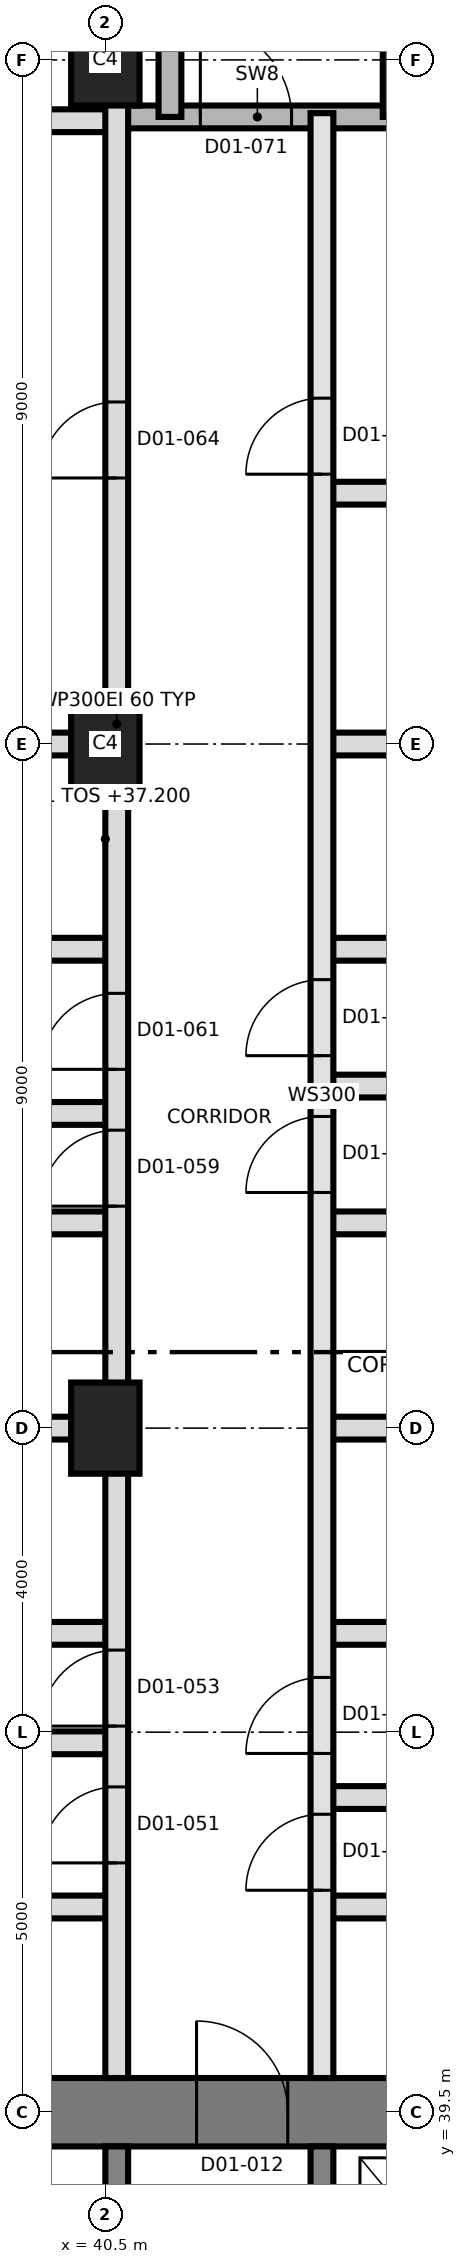
"""IFC4 building model, lengths in metres.
Left out: names, types, materials, properties, quantities, classifications, styles, units other than length and angle.
Written with IfcOpenShell. Run it as: python <this file> out.ifc"""

import sys

from ifc_helpers import new_model, si_unit, direction, frame, frame_2d, origin, origin_2d, place, context, subcontext, project, spatial, rectangle, extrude, element, fill, save


model = new_model("IFC4")
c1 = context("Model", 3, precision=1e-05, world=origin(), true_north=direction((0.0, 1.0)))
c2 = subcontext(c1, "Body", "Model", "MODEL_VIEW")
j1 = project(units=[si_unit("LENGTHUNIT", "METRE"), si_unit("PLANEANGLEUNIT", "RADIAN")], contexts=[c1])
p1 = place(None, origin())
s1 = spatial("IfcSite", under=j1, at=p1, CompositionType="ELEMENT")
p2 = place(p1, origin())
s2 = spatial("IfcBuilding", under=s1, at=p2, CompositionType="ELEMENT")
p3 = place(p2, frame((0.0, 0.0, 37.2)))
s3 = spatial("IfcBuildingStorey", under=s2, at=p3, CompositionType="ELEMENT", Elevation=37.2)
p4 = place(p3, frame((31.05, 39.5, 0.0), z_axis=(0.0, 0.0, 1.0), x_axis=(1.0, 0.0, 0.0)))
e1 = element("IfcWall", 1, at=p4, inside=s3, PredefinedType="SHEAR", context=c2, shape_type="SweptSolid", body=[
    extrude(rectangle(XDim=27.0, YDim=0.9, at=frame_2d((13.5, 0.0))), origin(), (0.0, 0.0, 1.0), 3.7),
])
p5 = place(p4, frame((10.65, 0.0, 0.0)))
e2 = element("IfcOpeningElement", 2, at=p5, cuts=e1, PredefinedType="OPENING", context=c2, shape_type="SweptSolid", body=[
    extrude(rectangle(XDim=1.2, YDim=2.1, at=frame_2d((0.6, 1.05))), frame((0.0, 0.46, 0.0), z_axis=(0.0, -1.0, 0.0), x_axis=(1.0, 0.0, 0.0)), (0.0, 0.0, 1.0), 0.92),
])
for number, where, z_axis, x_axis in (
    (3, (40.65, 33.5, 0.0), (0.0, 0.0, 1.0), (0.0, 1.0, 0.0)),
    (4, (43.35, 33.5, 0.0), (0.0, 0.0, 1.0), (0.0, 1.0, 0.0)),
):
    element("IfcWall", number, at=place(p3, frame(where, z_axis=z_axis, x_axis=x_axis)), inside=s3, PredefinedType="SHEAR", context=c2, shape_type="SweptSolid", body=[
        extrude(rectangle(XDim=5.55, YDim=0.3, at=frame_2d((2.775, 0.0))), origin(), (0.0, 0.0, 1.0), 3.7),
    ])
for number, where, z_axis, x_axis in (
    (5, (40.5, 48.5, 0.0), (0.0, 0.0, 1.0), (0.0, 1.0, 0.0)),
    (6, (40.5, 57.5, 0.0), (0.0, 0.0, 1.0), (0.0, 1.0, 0.0)),
    (7, (40.5, 66.5, 0.0), (0.0, 0.0, 1.0), (0.0, 1.0, 0.0)),
):
    element("IfcColumn", number, at=place(p3, frame(where, z_axis=z_axis, x_axis=x_axis)), inside=s3, PredefinedType="COLUMN", context=c2, shape_type="SweptSolid", body=[
        extrude(rectangle(XDim=1.2, YDim=0.9, at=origin_2d()), origin(), (0.0, 0.0, 1.0), 3.7),
    ])
for number, where, z_axis, x_axis in (
    (8, (37.45, 42.2, 0.0), (0.0, 0.0, 1.0), (1.0, 0.0, 0.0)),
    (9, (43.35, 42.2, 0.0), (0.0, 0.0, 1.0), (1.0, 0.0, 0.0)),
):
    element("IfcWall", number, at=place(p3, frame(where, z_axis=z_axis, x_axis=x_axis)), inside=s3, PredefinedType="PARTITIONING", context=c2, shape_type="SweptSolid", body=[
        extrude(rectangle(XDim=3.2, YDim=0.3, at=frame_2d((1.6, 0.0))), origin(), (0.0, 0.0, 1.0), 3.4),
    ])
p6 = place(p3, frame((43.35, 43.64, 0.0), z_axis=(0.0, 0.0, 1.0), x_axis=(1.0, 0.0, 0.0)))
e10 = element("IfcWall", 10, at=p6, inside=s3, PredefinedType="PARTITIONING", context=c2, shape_type="SweptSolid", body=[
    extrude(rectangle(XDim=6.796, YDim=0.3, at=frame_2d((3.398, 0.0))), origin(), (0.0, 0.0, 1.0), 3.4),
])
p7 = place(p3, frame((31.425, 44.36, 0.0), z_axis=(0.0, 0.0, 1.0), x_axis=(1.0, 0.0, 0.0)))
e11 = element("IfcWall", 11, at=p7, inside=s3, PredefinedType="PARTITIONING", context=c2, shape_type="SweptSolid", body=[
    extrude(rectangle(XDim=9.225, YDim=0.3, at=frame_2d((4.612, 0.0))), origin(), (0.0, 0.0, 1.0), 3.4),
])
for number, where, z_axis, x_axis in (
    (12, (37.45, 45.8, 0.0), (0.0, 0.0, 1.0), (1.0, 0.0, 0.0)),
    (13, (43.35, 45.8, 0.0), (0.0, 0.0, 1.0), (1.0, 0.0, 0.0)),
):
    element("IfcWall", number, at=place(p3, frame(where, z_axis=z_axis, x_axis=x_axis)), inside=s3, PredefinedType="PARTITIONING", context=c2, shape_type="SweptSolid", body=[
        extrude(rectangle(XDim=3.2, YDim=0.3, at=frame_2d((1.6, 0.0))), origin(), (0.0, 0.0, 1.0), 3.4),
    ])
p8 = place(p3, frame((31.425, 48.5, 0.0), z_axis=(0.0, 0.0, 1.0), x_axis=(1.0, 0.0, 0.0)))
e14 = element("IfcWall", 14, at=p8, inside=s3, PredefinedType="PARTITIONING", context=c2, shape_type="SweptSolid", body=[
    extrude(rectangle(XDim=9.225, YDim=0.3, at=frame_2d((4.612, 0.0))), origin(), (0.0, 0.0, 1.0), 3.4),
])
p9 = place(p3, frame((43.35, 48.5, 0.0), z_axis=(0.0, 0.0, 1.0), x_axis=(1.0, 0.0, 0.0)))
e15 = element("IfcWall", 15, at=p9, inside=s3, PredefinedType="PARTITIONING", context=c2, shape_type="SweptSolid", body=[
    extrude(rectangle(XDim=6.225, YDim=0.3, at=frame_2d((3.112, 0.0))), origin(), (0.0, 0.0, 1.0), 3.4),
])
for number, where, z_axis, x_axis in (
    (16, (37.45, 51.2, 0.0), (0.0, 0.0, 1.0), (1.0, 0.0, 0.0)),
    (17, (43.35, 51.2, 0.0), (0.0, 0.0, 1.0), (1.0, 0.0, 0.0)),
):
    element("IfcWall", number, at=place(p3, frame(where, z_axis=z_axis, x_axis=x_axis)), inside=s3, PredefinedType="PARTITIONING", context=c2, shape_type="SweptSolid", body=[
        extrude(rectangle(XDim=3.2, YDim=0.3, at=frame_2d((1.6, 0.0))), origin(), (0.0, 0.0, 1.0), 3.4),
    ])
p10 = place(p3, frame((31.425, 52.64, 0.0), z_axis=(0.0, 0.0, 1.0), x_axis=(1.0, 0.0, 0.0)))
e18 = element("IfcWall", 18, at=p10, inside=s3, PredefinedType="PARTITIONING", context=c2, shape_type="SweptSolid", body=[
    extrude(rectangle(XDim=9.225, YDim=0.3, at=frame_2d((4.612, 0.0))), origin(), (0.0, 0.0, 1.0), 3.4),
])
p11 = place(p3, frame((43.35, 53.0, 0.0), z_axis=(0.0, 0.0, 1.0), x_axis=(1.0, 0.0, 0.0)))
e19 = element("IfcWall", 19, at=p11, inside=s3, PredefinedType="PARTITIONING", context=c2, shape_type="SweptSolid", body=[
    extrude(rectangle(XDim=6.405, YDim=0.3, at=frame_2d((3.202, 0.0))), origin(), (0.0, 0.0, 1.0), 3.4),
])
for number, where, z_axis, x_axis in (
    (20, (37.45, 54.8, 0.0), (0.0, 0.0, 1.0), (1.0, 0.0, 0.0)),
    (21, (43.35, 54.8, 0.0), (0.0, 0.0, 1.0), (1.0, 0.0, 0.0)),
):
    element("IfcWall", number, at=place(p3, frame(where, z_axis=z_axis, x_axis=x_axis)), inside=s3, PredefinedType="PARTITIONING", context=c2, shape_type="SweptSolid", body=[
        extrude(rectangle(XDim=3.2, YDim=0.3, at=frame_2d((1.6, 0.0))), origin(), (0.0, 0.0, 1.0), 3.4),
    ])
p12 = place(p3, frame((31.425, 57.5, 0.0), z_axis=(0.0, 0.0, 1.0), x_axis=(1.0, 0.0, 0.0)))
e22 = element("IfcWall", 22, at=p12, inside=s3, PredefinedType="PARTITIONING", context=c2, shape_type="SweptSolid", body=[
    extrude(rectangle(XDim=9.225, YDim=0.3, at=frame_2d((4.612, 0.0))), origin(), (0.0, 0.0, 1.0), 3.4),
])
p13 = place(p3, frame((43.35, 57.5, 0.0), z_axis=(0.0, 0.0, 1.0), x_axis=(1.0, 0.0, 0.0)))
e23 = element("IfcWall", 23, at=p13, inside=s3, PredefinedType="PARTITIONING", context=c2, shape_type="SweptSolid", body=[
    extrude(rectangle(XDim=6.225, YDim=0.3, at=frame_2d((3.112, 0.0))), origin(), (0.0, 0.0, 1.0), 3.4),
])
p14 = place(p3, frame((43.35, 60.8, 0.0), z_axis=(0.0, 0.0, 1.0), x_axis=(1.0, 0.0, 0.0)))
e24 = element("IfcWall", 24, at=p14, inside=s3, PredefinedType="PARTITIONING", context=c2, shape_type="SweptSolid", body=[
    extrude(rectangle(XDim=3.5, YDim=0.3, at=frame_2d((1.75, 0.0))), origin(), (0.0, 0.0, 1.0), 3.4),
])
p15 = place(p3, frame((31.425, 65.7, 0.0), z_axis=(0.0, 0.0, 1.0), x_axis=(1.0, 0.0, 0.0)))
e25 = element("IfcWall", 25, at=p15, inside=s3, PredefinedType="PARTITIONING", context=c2, shape_type="SweptSolid", body=[
    extrude(rectangle(XDim=9.225, YDim=0.3, at=frame_2d((4.612, 0.0))), origin(), (0.0, 0.0, 1.0), 3.4),
])
p16 = place(p15, frame((3.575, 0.0, 0.0)))
e26 = element("IfcOpeningElement", 26, at=p16, cuts=e25, PredefinedType="OPENING", context=c2, shape_type="SweptSolid", body=[
    extrude(rectangle(XDim=1.0, YDim=2.1, at=frame_2d((0.5, 1.05))), frame((0.0, 0.16, 0.0), z_axis=(0.0, -1.0, 0.0), x_axis=(1.0, 0.0, 0.0)), (0.0, 0.0, 1.0), 0.32),
])
p17 = place(p3, frame((40.65, 65.75, 0.0), z_axis=(0.0, 0.0, 1.0), x_axis=(1.0, 0.0, 0.0)))
e27 = element("IfcWall", 27, at=p17, inside=s3, PredefinedType="SHEAR", context=c2, shape_type="SweptSolid", body=[
    extrude(rectangle(XDim=3.7, YDim=0.3, at=frame_2d((1.85, 0.0))), origin(), (0.0, 0.0, 1.0), 3.4),
])
p18 = place(p17, frame((1.1, 0.0, 0.0)))
e28 = element("IfcOpeningElement", 28, at=p18, cuts=e27, PredefinedType="OPENING", context=c2, shape_type="SweptSolid", body=[
    extrude(rectangle(XDim=1.2, YDim=2.1, at=frame_2d((0.6, 1.05))), frame((0.0, 0.16, 0.0), z_axis=(0.0, -1.0, 0.0), x_axis=(1.0, 0.0, 0.0)), (0.0, 0.0, 1.0), 0.32),
])
p19 = place(p3, frame((40.65, 39.95, 0.0), z_axis=(0.0, 0.0, 1.0), x_axis=(0.0, 1.0, 0.0)))
e29 = element("IfcWall", 29, at=p19, inside=s3, PredefinedType="PARTITIONING", context=c2, shape_type="SweptSolid", body=[
    extrude(rectangle(XDim=35.625, YDim=0.3, at=frame_2d((17.812, 0.0))), origin(), (0.0, 0.0, 1.0), 3.4),
])
p20 = place(p19, frame((2.83, 0.0, 0.0)))
e30 = element("IfcOpeningElement", 30, at=p20, cuts=e29, PredefinedType="OPENING", context=c2, shape_type="SweptSolid", body=[
    extrude(rectangle(XDim=1.0, YDim=2.1, at=frame_2d((0.5, 1.05))), frame((0.0, 0.16, 0.0), z_axis=(0.0, -1.0, 0.0), x_axis=(1.0, 0.0, 0.0)), (0.0, 0.0, 1.0), 0.32),
])
p21 = place(p19, frame((4.63, 0.0, 0.0)))
e31 = element("IfcOpeningElement", 31, at=p21, cuts=e29, PredefinedType="OPENING", context=c2, shape_type="SweptSolid", body=[
    extrude(rectangle(XDim=1.0, YDim=2.1, at=frame_2d((0.5, 1.05))), frame((0.0, 0.16, 0.0), z_axis=(0.0, -1.0, 0.0), x_axis=(1.0, 0.0, 0.0)), (0.0, 0.0, 1.0), 0.32),
])
p22 = place(p19, frame((11.47, 0.0, 0.0)))
e32 = element("IfcOpeningElement", 32, at=p22, cuts=e29, PredefinedType="OPENING", context=c2, shape_type="SweptSolid", body=[
    extrude(rectangle(XDim=1.0, YDim=2.1, at=frame_2d((0.5, 1.05))), frame((0.0, 0.16, 0.0), z_axis=(0.0, -1.0, 0.0), x_axis=(1.0, 0.0, 0.0)), (0.0, 0.0, 1.0), 0.32),
])
p23 = place(p19, frame((13.27, 0.0, 0.0)))
e33 = element("IfcOpeningElement", 33, at=p23, cuts=e29, PredefinedType="OPENING", context=c2, shape_type="SweptSolid", body=[
    extrude(rectangle(XDim=1.0, YDim=2.1, at=frame_2d((0.5, 1.05))), frame((0.0, 0.16, 0.0), z_axis=(0.0, -1.0, 0.0), x_axis=(1.0, 0.0, 0.0)), (0.0, 0.0, 1.0), 0.32),
])
p24 = place(p19, frame((21.05, 0.0, 0.0)))
e34 = element("IfcOpeningElement", 34, at=p24, cuts=e29, PredefinedType="OPENING", context=c2, shape_type="SweptSolid", body=[
    extrude(rectangle(XDim=1.0, YDim=2.4, at=frame_2d((0.5, 1.2))), frame((0.0, 0.16, 0.0), z_axis=(0.0, -1.0, 0.0), x_axis=(1.0, 0.0, 0.0)), (0.0, 0.0, 1.0), 0.32),
])
p25 = place(p3, frame((41.35, 65.75, 0.0), z_axis=(0.0, 0.0, 1.0), x_axis=(0.0, 1.0, 0.0)))
e35 = element("IfcWall", 35, at=p25, inside=s3, PredefinedType="SHEAR", context=c2, shape_type="SweptSolid", body=[
    extrude(rectangle(XDim=8.85, YDim=0.3, at=frame_2d((4.425, 0.0))), origin(), (0.0, 0.0, 1.0), 3.4),
])
p26 = place(p3, frame((43.35, 39.95, 0.0), z_axis=(0.0, 0.0, 1.0), x_axis=(0.0, 1.0, 0.0)))
e36 = element("IfcWall", 36, at=p26, inside=s3, PredefinedType="SOLIDWALL", context=c2, shape_type="SweptSolid", body=[
    extrude(rectangle(XDim=25.85, YDim=0.3, at=frame_2d((12.925, 0.0))), origin(), (0.0, 0.0, 1.0), 3.4),
])
p27 = place(p26, frame((2.47, 0.0, 0.0)))
e37 = element("IfcOpeningElement", 37, at=p27, cuts=e36, PredefinedType="OPENING", context=c2, shape_type="SweptSolid", body=[
    extrude(rectangle(XDim=1.0, YDim=2.1, at=frame_2d((0.5, 1.05))), frame((0.0, 0.16, 0.0), z_axis=(0.0, -1.0, 0.0), x_axis=(1.0, 0.0, 0.0)), (0.0, 0.0, 1.0), 0.32),
])
p28 = place(p26, frame((4.27, 0.0, 0.0)))
e38 = element("IfcOpeningElement", 38, at=p28, cuts=e36, PredefinedType="OPENING", context=c2, shape_type="SweptSolid", body=[
    extrude(rectangle(XDim=1.0, YDim=2.1, at=frame_2d((0.5, 1.05))), frame((0.0, 0.16, 0.0), z_axis=(0.0, -1.0, 0.0), x_axis=(1.0, 0.0, 0.0)), (0.0, 0.0, 1.0), 0.32),
])
p29 = place(p26, frame((11.65, 0.0, 0.0)))
e39 = element("IfcOpeningElement", 39, at=p29, cuts=e36, PredefinedType="OPENING", context=c2, shape_type="SweptSolid", body=[
    extrude(rectangle(XDim=1.0, YDim=2.1, at=frame_2d((0.5, 1.05))), frame((0.0, 0.16, 0.0), z_axis=(0.0, -1.0, 0.0), x_axis=(1.0, 0.0, 0.0)), (0.0, 0.0, 1.0), 0.32),
])
p30 = place(p26, frame((13.45, 0.0, 0.0)))
e40 = element("IfcOpeningElement", 40, at=p30, cuts=e36, PredefinedType="OPENING", context=c2, shape_type="SweptSolid", body=[
    extrude(rectangle(XDim=1.0, YDim=2.1, at=frame_2d((0.5, 1.05))), frame((0.0, 0.16, 0.0), z_axis=(0.0, -1.0, 0.0), x_axis=(1.0, 0.0, 0.0)), (0.0, 0.0, 1.0), 0.32),
])
p31 = place(p26, frame((21.1, 0.0, 0.0)))
e41 = element("IfcOpeningElement", 41, at=p31, cuts=e36, PredefinedType="OPENING", context=c2, shape_type="SweptSolid", body=[
    extrude(rectangle(XDim=1.0, YDim=2.4, at=frame_2d((0.5, 1.2))), frame((0.0, 0.16, 0.0), z_axis=(0.0, -1.0, 0.0), x_axis=(1.0, 0.0, 0.0)), (0.0, 0.0, 1.0), 0.32),
])
p32 = place(p3, frame((44.3, 65.75, 0.0), z_axis=(0.0, 0.0, 1.0), x_axis=(0.0, 1.0, 0.0)))
e42 = element("IfcWall", 42, at=p32, inside=s3, PredefinedType="SHEAR", context=c2, shape_type="SweptSolid", body=[
    extrude(rectangle(XDim=8.85, YDim=0.3, at=frame_2d((4.425, 0.0))), origin(), (0.0, 0.0, 1.0), 3.4),
])
p33 = place(p5, origin())
e43 = element("IfcDoor", 43, at=p33, inside=s3, OperationType="SINGLE_SWING_RIGHT", PredefinedType="DOOR", context=c2, shape_type="SweptSolid", body=[
    extrude(rectangle(XDim=1.2, YDim=2.1, at=frame_2d((0.6, 1.05))), frame((0.0, 0.025, 0.0), z_axis=(0.0, -1.0, 0.0), x_axis=(1.0, 0.0, 0.0)), (0.0, 0.0, 1.0), 0.05),
])
fill(e2, e43)
p34 = place(p27, origin())
e44 = element("IfcDoor", 44, at=p34, inside=s3, OperationType="SINGLE_SWING_LEFT", PredefinedType="DOOR", context=c2, shape_type="SweptSolid", body=[
    extrude(rectangle(XDim=1.0, YDim=2.1, at=frame_2d((0.5, 1.05))), frame((0.0, 0.025, 0.0), z_axis=(0.0, -1.0, 0.0), x_axis=(1.0, 0.0, 0.0)), (0.0, 0.0, 1.0), 0.05),
])
fill(e37, e44)
p35 = place(p28, origin())
e45 = element("IfcDoor", 45, at=p35, inside=s3, OperationType="SINGLE_SWING_LEFT", PredefinedType="DOOR", context=c2, shape_type="SweptSolid", body=[
    extrude(rectangle(XDim=1.0, YDim=2.1, at=frame_2d((0.5, 1.05))), frame((0.0, 0.025, 0.0), z_axis=(0.0, -1.0, 0.0), x_axis=(1.0, 0.0, 0.0)), (0.0, 0.0, 1.0), 0.05),
])
fill(e38, e45)
p36 = place(p20, origin())
e46 = element("IfcDoor", 46, at=p36, inside=s3, OperationType="SINGLE_SWING_RIGHT", PredefinedType="DOOR", context=c2, shape_type="SweptSolid", body=[
    extrude(rectangle(XDim=1.0, YDim=2.1, at=frame_2d((0.5, 1.05))), frame((0.0, 0.025, 0.0), z_axis=(0.0, -1.0, 0.0), x_axis=(1.0, 0.0, 0.0)), (0.0, 0.0, 1.0), 0.05),
])
fill(e30, e46)
p37 = place(p21, origin())
e47 = element("IfcDoor", 47, at=p37, inside=s3, OperationType="SINGLE_SWING_LEFT", PredefinedType="DOOR", context=c2, shape_type="SweptSolid", body=[
    extrude(rectangle(XDim=1.0, YDim=2.1, at=frame_2d((0.5, 1.05))), frame((0.0, 0.025, 0.0), z_axis=(0.0, -1.0, 0.0), x_axis=(1.0, 0.0, 0.0)), (0.0, 0.0, 1.0), 0.05),
])
fill(e31, e47)
p38 = place(p29, origin())
e48 = element("IfcDoor", 48, at=p38, inside=s3, OperationType="SINGLE_SWING_LEFT", PredefinedType="DOOR", context=c2, shape_type="SweptSolid", body=[
    extrude(rectangle(XDim=1.0, YDim=2.1, at=frame_2d((0.5, 1.05))), frame((0.0, 0.025, 0.0), z_axis=(0.0, -1.0, 0.0), x_axis=(1.0, 0.0, 0.0)), (0.0, 0.0, 1.0), 0.05),
])
fill(e39, e48)
p39 = place(p30, origin())
e49 = element("IfcDoor", 49, at=p39, inside=s3, OperationType="SINGLE_SWING_RIGHT", PredefinedType="DOOR", context=c2, shape_type="SweptSolid", body=[
    extrude(rectangle(XDim=1.0, YDim=2.1, at=frame_2d((0.5, 1.05))), frame((0.0, 0.025, 0.0), z_axis=(0.0, -1.0, 0.0), x_axis=(1.0, 0.0, 0.0)), (0.0, 0.0, 1.0), 0.05),
])
fill(e40, e49)
p40 = place(p22, origin())
e50 = element("IfcDoor", 50, at=p40, inside=s3, OperationType="SINGLE_SWING_LEFT", PredefinedType="DOOR", context=c2, shape_type="SweptSolid", body=[
    extrude(rectangle(XDim=1.0, YDim=2.1, at=frame_2d((0.5, 1.05))), frame((0.0, 0.025, 0.0), z_axis=(0.0, -1.0, 0.0), x_axis=(1.0, 0.0, 0.0)), (0.0, 0.0, 1.0), 0.05),
])
fill(e32, e50)
p41 = place(p23, origin())
e51 = element("IfcDoor", 51, at=p41, inside=s3, OperationType="SINGLE_SWING_LEFT", PredefinedType="DOOR", context=c2, shape_type="SweptSolid", body=[
    extrude(rectangle(XDim=1.0, YDim=2.1, at=frame_2d((0.5, 1.05))), frame((0.0, 0.025, 0.0), z_axis=(0.0, -1.0, 0.0), x_axis=(1.0, 0.0, 0.0)), (0.0, 0.0, 1.0), 0.05),
])
fill(e33, e51)
p42 = place(p31, origin())
e52 = element("IfcDoor", 52, at=p42, inside=s3, OperationType="SINGLE_SWING_RIGHT", PredefinedType="DOOR", context=c2, shape_type="SweptSolid", body=[
    extrude(rectangle(XDim=1.0, YDim=2.4, at=frame_2d((0.5, 1.2))), frame((0.0, 0.025, 0.0), z_axis=(0.0, -1.0, 0.0), x_axis=(1.0, 0.0, 0.0)), (0.0, 0.0, 1.0), 0.05),
])
fill(e41, e52)
p43 = place(p24, origin())
e53 = element("IfcDoor", 53, at=p43, inside=s3, OperationType="SINGLE_SWING_LEFT", PredefinedType="DOOR", context=c2, shape_type="SweptSolid", body=[
    extrude(rectangle(XDim=1.0, YDim=2.4, at=frame_2d((0.5, 1.2))), frame((0.0, 0.025, 0.0), z_axis=(0.0, -1.0, 0.0), x_axis=(1.0, 0.0, 0.0)), (0.0, 0.0, 1.0), 0.05),
])
fill(e34, e53)
p44 = place(p18, origin())
e54 = element("IfcDoor", 54, at=p44, inside=s3, OperationType="SINGLE_SWING_RIGHT", PredefinedType="DOOR", context=c2, shape_type="SweptSolid", body=[
    extrude(rectangle(XDim=1.2, YDim=2.1, at=frame_2d((0.6, 1.05))), frame((0.0, 0.025, 0.0), z_axis=(0.0, -1.0, 0.0), x_axis=(1.0, 0.0, 0.0)), (0.0, 0.0, 1.0), 0.05),
])
fill(e28, e54)
save(model, sys.argv[1])
